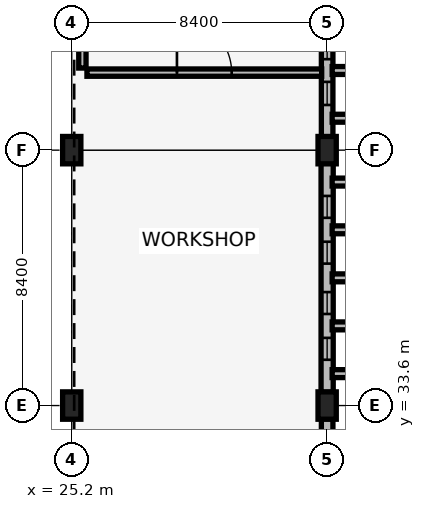
"""IFC4 building model, lengths in metres.
Left out: names, types, materials, properties, quantities, classifications, styles, units other than length and angle.
Written with IfcOpenShell. Run it as: python <this file> out.ifc"""

import sys

from ifc_helpers import new_model, si_unit, direction, frame, frame_2d, origin, origin_2d, place, context, subcontext, project, spatial, rectangle, extrude, element, fill, save


model = new_model("IFC4")
c1 = context("Model", 3, precision=1e-05, world=origin(), true_north=direction((0.0, 1.0)))
c2 = subcontext(c1, "Body", "Model", "MODEL_VIEW")
j1 = project(units=[si_unit("LENGTHUNIT", "METRE"), si_unit("PLANEANGLEUNIT", "RADIAN")], contexts=[c1])
p1 = place(None, origin())
s1 = spatial("IfcSite", under=j1, at=p1, CompositionType="ELEMENT")
p2 = place(p1, origin())
s2 = spatial("IfcBuilding", under=s1, at=p2, CompositionType="ELEMENT")
p3 = place(p2, frame((0.0, 0.0, 5.44)))
s3 = spatial("IfcBuildingStorey", under=s2, at=p3, CompositionType="ELEMENT", Elevation=5.44)
for number, where, z_axis, x_axis in (
    (1, (25.2, 33.6, 0.0), (0.0, 0.0, 1.0), (1.0, 0.0, 0.0)),
    (2, (25.2, 42.0, 0.0), (0.0, 0.0, 1.0), (1.0, 0.0, 0.0)),
    (3, (33.6, 33.6, 0.0), (0.0, 0.0, 1.0), (1.0, 0.0, 0.0)),
    (4, (33.6, 42.0, 0.0), (0.0, 0.0, 1.0), (1.0, 0.0, 0.0)),
):
    element("IfcColumn", number, at=place(p3, frame(where, z_axis=z_axis, x_axis=x_axis)), inside=s3, PredefinedType="COLUMN", context=c2, shape_type="SweptSolid", body=[
        extrude(rectangle(XDim=0.6, YDim=0.9, at=origin_2d()), origin(), (0.0, 0.0, 1.0), 4.12),
    ])
p4 = place(p3, frame((33.6, 25.635, 0.0), z_axis=(0.0, 0.0, 1.0), x_axis=(0.0, 1.0, 0.0)))
e5 = element("IfcWall", 5, at=p4, inside=s3, PredefinedType="SOLIDWALL", context=c2, shape_type="SweptSolid", body=[
    extrude(rectangle(XDim=7.53, YDim=0.38, at=frame_2d((3.765, 0.0))), origin(), (0.0, 0.0, 1.0), 4.02),
])
p5 = place(p3, frame((33.6, 34.035, 0.0), z_axis=(0.0, 0.0, 1.0), x_axis=(0.0, 1.0, 0.0)))
e6 = element("IfcWall", 6, at=p5, inside=s3, PredefinedType="SOLIDWALL", context=c2, shape_type="SweptSolid", body=[
    extrude(rectangle(XDim=7.53, YDim=0.4, at=frame_2d((3.765, 0.0))), origin(), (0.0, 0.0, 1.0), 4.02),
])
p6 = place(p5, frame((1.071, 0.0, 0.75)))
e7 = element("IfcOpeningElement", 7, at=p6, cuts=e6, PredefinedType="OPENING", context=c2, shape_type="SweptSolid", body=[
    extrude(rectangle(XDim=0.72, YDim=2.6, at=frame_2d((0.36, 1.3))), frame((0.0, 0.21, 0.0), z_axis=(0.0, -1.0, 0.0), x_axis=(1.0, 0.0, 0.0)), (0.0, 0.0, 1.0), 0.42),
])
p7 = place(p5, frame((2.577, 0.0, 0.75)))
e8 = element("IfcOpeningElement", 8, at=p7, cuts=e6, PredefinedType="OPENING", context=c2, shape_type="SweptSolid", body=[
    extrude(rectangle(XDim=0.72, YDim=2.6, at=frame_2d((0.36, 1.3))), frame((0.0, 0.21, 0.0), z_axis=(0.0, -1.0, 0.0), x_axis=(1.0, 0.0, 0.0)), (0.0, 0.0, 1.0), 0.42),
])
p8 = place(p5, frame((4.233, 0.0, 0.75)))
e9 = element("IfcOpeningElement", 9, at=p8, cuts=e6, PredefinedType="OPENING", context=c2, shape_type="SweptSolid", body=[
    extrude(rectangle(XDim=0.72, YDim=2.6, at=frame_2d((0.36, 1.3))), frame((0.0, 0.21, 0.0), z_axis=(0.0, -1.0, 0.0), x_axis=(1.0, 0.0, 0.0)), (0.0, 0.0, 1.0), 0.42),
])
p9 = place(p5, frame((5.739, 0.0, 0.75)))
e10 = element("IfcOpeningElement", 10, at=p9, cuts=e6, PredefinedType="OPENING", context=c2, shape_type="SweptSolid", body=[
    extrude(rectangle(XDim=0.72, YDim=2.6, at=frame_2d((0.36, 1.3))), frame((0.0, 0.21, 0.0), z_axis=(0.0, -1.0, 0.0), x_axis=(1.0, 0.0, 0.0)), (0.0, 0.0, 1.0), 0.42),
])
for number, where, z_axis, x_axis in (
    (11, (33.765, 34.65, 0.0), (0.0, 0.0, 1.0), (1.0, 0.0, 0.0)),
    (12, (33.765, 36.22, 0.0), (0.0, 0.0, 1.0), (1.0, 0.0, 0.0)),
    (13, (33.765, 37.8, 0.0), (0.0, 0.0, 1.0), (1.0, 0.0, 0.0)),
    (14, (33.765, 39.38, 0.0), (0.0, 0.0, 1.0), (1.0, 0.0, 0.0)),
    (15, (33.765, 40.95, 0.0), (0.0, 0.0, 1.0), (1.0, 0.0, 0.0)),
):
    element("IfcWall", number, at=place(p3, frame(where, z_axis=z_axis, x_axis=x_axis)), inside=s3, PredefinedType="SOLIDWALL", context=c2, shape_type="SweptSolid", body=[
        extrude(rectangle(XDim=0.7, YDim=0.26, at=frame_2d((0.35, 0.0))), origin(), (0.0, 0.0, 1.0), 4.42),
    ])
p10 = place(p3, frame((33.6, 42.435, 0.0), z_axis=(0.0, 0.0, 1.0), x_axis=(0.0, 1.0, 0.0)))
e16 = element("IfcWall", 16, at=p10, inside=s3, PredefinedType="SOLIDWALL", context=c2, shape_type="SweptSolid", body=[
    extrude(rectangle(XDim=7.53, YDim=0.38, at=frame_2d((3.765, 0.0))), origin(), (0.0, 0.0, 1.0), 4.02),
])
p11 = place(p10, frame((1.051, 0.0, 0.75)))
e17 = element("IfcOpeningElement", 17, at=p11, cuts=e16, PredefinedType="OPENING", context=c2, shape_type="SweptSolid", body=[
    extrude(rectangle(XDim=0.76, YDim=2.45, at=frame_2d((0.38, 1.225))), frame((0.0, 0.2, 0.0), z_axis=(0.0, -1.0, 0.0), x_axis=(1.0, 0.0, 0.0)), (0.0, 0.0, 1.0), 0.4),
])
p12 = place(p10, frame((2.557, 0.0, 0.75)))
e18 = element("IfcOpeningElement", 18, at=p12, cuts=e16, PredefinedType="OPENING", context=c2, shape_type="SweptSolid", body=[
    extrude(rectangle(XDim=0.76, YDim=2.45, at=frame_2d((0.38, 1.225))), frame((0.0, 0.2, 0.0), z_axis=(0.0, -1.0, 0.0), x_axis=(1.0, 0.0, 0.0)), (0.0, 0.0, 1.0), 0.4),
])
p13 = place(p10, frame((4.213, 0.0, 0.75)))
e19 = element("IfcOpeningElement", 19, at=p13, cuts=e16, PredefinedType="OPENING", context=c2, shape_type="SweptSolid", body=[
    extrude(rectangle(XDim=0.76, YDim=2.45, at=frame_2d((0.38, 1.225))), frame((0.0, 0.2, 0.0), z_axis=(0.0, -1.0, 0.0), x_axis=(1.0, 0.0, 0.0)), (0.0, 0.0, 1.0), 0.4),
])
p14 = place(p10, frame((5.719, 0.0, 0.75)))
e20 = element("IfcOpeningElement", 20, at=p14, cuts=e16, PredefinedType="OPENING", context=c2, shape_type="SweptSolid", body=[
    extrude(rectangle(XDim=0.76, YDim=2.45, at=frame_2d((0.38, 1.225))), frame((0.0, 0.2, 0.0), z_axis=(0.0, -1.0, 0.0), x_axis=(1.0, 0.0, 0.0)), (0.0, 0.0, 1.0), 0.4),
])
for number, where, z_axis, x_axis in (
    (21, (33.765, 43.05, 0.0), (0.0, 0.0, 1.0), (1.0, 0.0, 0.0)),
    (22, (33.765, 44.62, 0.0), (0.0, 0.0, 1.0), (1.0, 0.0, 0.0)),
):
    element("IfcWall", number, at=place(p3, frame(where, z_axis=z_axis, x_axis=x_axis)), inside=s3, PredefinedType="SOLIDWALL", context=c2, shape_type="SweptSolid", body=[
        extrude(rectangle(XDim=0.7, YDim=0.26, at=frame_2d((0.35, 0.0))), origin(), (0.0, 0.0, 1.0), 4.42),
    ])
p15 = place(p3, frame((25.7, 44.55, 0.0), z_axis=(0.0, 0.0, 1.0), x_axis=(1.0, 0.0, 0.0)))
e23 = element("IfcWall", 23, at=p15, inside=s3, PredefinedType="PARTITIONING", context=c2, shape_type="SweptSolid", body=[
    extrude(rectangle(XDim=7.72, YDim=0.24, at=frame_2d((3.86, 0.0))), origin(), (0.0, 0.0, 1.0), 4.02),
])
p16 = place(p15, frame((2.96, 0.0, 0.0)))
e24 = element("IfcOpeningElement", 24, at=p16, cuts=e23, PredefinedType="OPENING", context=c2, shape_type="SweptSolid", body=[
    extrude(rectangle(XDim=1.8, YDim=2.4, at=frame_2d((0.9, 1.2))), frame((0.0, 0.13, 0.0), z_axis=(0.0, -1.0, 0.0), x_axis=(1.0, 0.0, 0.0)), (0.0, 0.0, 1.0), 0.26),
])
p17 = place(p3, frame((25.55, 44.7, 0.0), z_axis=(0.0, 0.0, 1.0), x_axis=(0.0, 1.0, 0.0)))
e25 = element("IfcWall", 25, at=p17, inside=s3, PredefinedType="PARTITIONING", context=c2, shape_type="SweptSolid", body=[
    extrude(rectangle(XDim=5.19, YDim=0.24, at=frame_2d((2.595, 0.0))), origin(), (0.0, 0.0, 1.0), 4.12),
])
p18 = place(p6, origin())
e26 = element("IfcWindow", 26, at=p18, inside=s3, PartitioningType="DOUBLE_PANEL_VERTICAL", PredefinedType="WINDOW", context=c2, shape_type="SweptSolid", body=[
    extrude(rectangle(XDim=0.72, YDim=2.6, at=frame_2d((0.36, 1.3))), frame((0.0, 0.03, 0.0), z_axis=(0.0, -1.0, 0.0), x_axis=(1.0, 0.0, 0.0)), (0.0, 0.0, 1.0), 0.06),
])
fill(e7, e26)
p19 = place(p7, origin())
e27 = element("IfcWindow", 27, at=p19, inside=s3, PartitioningType="DOUBLE_PANEL_VERTICAL", PredefinedType="WINDOW", context=c2, shape_type="SweptSolid", body=[
    extrude(rectangle(XDim=0.72, YDim=2.6, at=frame_2d((0.36, 1.3))), frame((0.0, 0.03, 0.0), z_axis=(0.0, -1.0, 0.0), x_axis=(1.0, 0.0, 0.0)), (0.0, 0.0, 1.0), 0.06),
])
fill(e8, e27)
p20 = place(p8, origin())
e28 = element("IfcWindow", 28, at=p20, inside=s3, PartitioningType="DOUBLE_PANEL_VERTICAL", PredefinedType="WINDOW", context=c2, shape_type="SweptSolid", body=[
    extrude(rectangle(XDim=0.72, YDim=2.6, at=frame_2d((0.36, 1.3))), frame((0.0, 0.03, 0.0), z_axis=(0.0, -1.0, 0.0), x_axis=(1.0, 0.0, 0.0)), (0.0, 0.0, 1.0), 0.06),
])
fill(e9, e28)
p21 = place(p9, origin())
e29 = element("IfcWindow", 29, at=p21, inside=s3, PartitioningType="DOUBLE_PANEL_VERTICAL", PredefinedType="WINDOW", context=c2, shape_type="SweptSolid", body=[
    extrude(rectangle(XDim=0.72, YDim=2.6, at=frame_2d((0.36, 1.3))), frame((0.0, 0.03, 0.0), z_axis=(0.0, -1.0, 0.0), x_axis=(1.0, 0.0, 0.0)), (0.0, 0.0, 1.0), 0.06),
])
fill(e10, e29)
p22 = place(p11, origin())
e30 = element("IfcWindow", 30, at=p22, inside=s3, PartitioningType="DOUBLE_PANEL_VERTICAL", PredefinedType="WINDOW", context=c2, shape_type="SweptSolid", body=[
    extrude(rectangle(XDim=0.76, YDim=2.45, at=frame_2d((0.38, 1.225))), frame((0.0, 0.03, 0.0), z_axis=(0.0, -1.0, 0.0), x_axis=(1.0, 0.0, 0.0)), (0.0, 0.0, 1.0), 0.06),
])
fill(e17, e30)
p23 = place(p12, origin())
e31 = element("IfcWindow", 31, at=p23, inside=s3, PartitioningType="DOUBLE_PANEL_VERTICAL", PredefinedType="WINDOW", context=c2, shape_type="SweptSolid", body=[
    extrude(rectangle(XDim=0.76, YDim=2.45, at=frame_2d((0.38, 1.225))), frame((0.0, 0.03, 0.0), z_axis=(0.0, -1.0, 0.0), x_axis=(1.0, 0.0, 0.0)), (0.0, 0.0, 1.0), 0.06),
])
fill(e18, e31)
p24 = place(p16, origin())
e32 = element("IfcDoor", 32, at=p24, inside=s3, OperationType="DOUBLE_DOOR_SINGLE_SWING", PredefinedType="DOOR", context=c2, shape_type="SweptSolid", body=[
    extrude(rectangle(XDim=1.8, YDim=2.4, at=frame_2d((0.9, 1.2))), frame((0.0, 0.025, 0.0), z_axis=(0.0, -1.0, 0.0), x_axis=(1.0, 0.0, 0.0)), (0.0, 0.0, 1.0), 0.05),
])
fill(e24, e32)
save(model, sys.argv[1])
